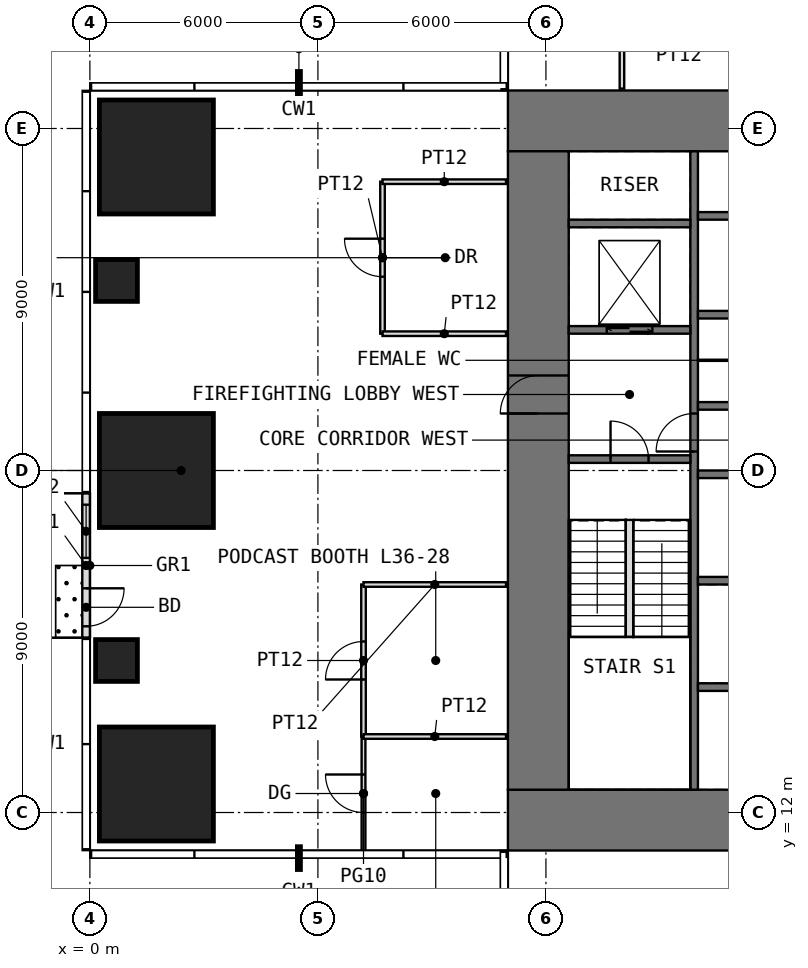
"""IFC4 building model, lengths in metres.
Left out: names, types, materials, properties, quantities, classifications, styles, units other than length and angle.
Written with IfcOpenShell. Run it as: python <this file> out.ifc"""

import sys

from ifc_helpers import new_model, si_unit, direction, frame, frame_2d, origin, origin_2d, place, context, subcontext, project, spatial, rectangle, extrude, element, fill, save


model = new_model("IFC4")
c1 = context("Model", 3, precision=1e-05, world=origin(), true_north=direction((0.0, 1.0)))
c2 = subcontext(c1, "Body", "Model", "MODEL_VIEW")
j1 = project(units=[si_unit("LENGTHUNIT", "METRE"), si_unit("PLANEANGLEUNIT", "RADIAN")], contexts=[c1])
p1 = place(None, origin())
s1 = spatial("IfcSite", under=j1, at=p1, CompositionType="ELEMENT")
p2 = place(p1, origin())
s2 = spatial("IfcBuilding", under=s1, at=p2, CompositionType="ELEMENT")
p3 = place(p2, frame((0.0, 0.0, 152.5)))
s3 = spatial("IfcBuildingStorey", under=s2, at=p3, CompositionType="ELEMENT", Elevation=152.5)
p4 = place(p3, frame((1.75, 12.75, 0.0), z_axis=(0.0, 0.0, 1.0), x_axis=(1.0, 0.0, 0.0)))
e1 = element("IfcColumn", 1, at=p4, inside=s3, PredefinedType="COLUMN", context=c2, shape_type="SweptSolid", body=[
    extrude(rectangle(XDim=3.0, YDim=3.0, at=origin_2d()), origin(), (0.0, 0.0, 1.0), 4.0),
])
p5 = place(p3, frame((0.7, 16.0, 0.0), z_axis=(0.0, 0.0, 1.0), x_axis=(1.0, 0.0, 0.0)))
e2 = element("IfcColumn", 2, at=p5, inside=s3, PredefinedType="COLUMN", context=c2, shape_type="SweptSolid", body=[
    extrude(rectangle(XDim=1.1, YDim=1.1, at=origin_2d()), origin(), (0.0, 0.0, 1.0), 4.0),
])
p6 = place(p3, frame((1.75, 21.0, 0.0), z_axis=(0.0, 0.0, 1.0), x_axis=(1.0, 0.0, 0.0)))
e3 = element("IfcColumn", 3, at=p6, inside=s3, PredefinedType="COLUMN", context=c2, shape_type="SweptSolid", body=[
    extrude(rectangle(XDim=3.0, YDim=3.0, at=origin_2d()), origin(), (0.0, 0.0, 1.0), 4.0),
])
p7 = place(p3, frame((0.7, 26.0, 0.0), z_axis=(0.0, 0.0, 1.0), x_axis=(1.0, 0.0, 0.0)))
e4 = element("IfcColumn", 4, at=p7, inside=s3, PredefinedType="COLUMN", context=c2, shape_type="SweptSolid", body=[
    extrude(rectangle(XDim=1.1, YDim=1.1, at=origin_2d()), origin(), (0.0, 0.0, 1.0), 4.0),
])
p8 = place(p3, frame((1.75, 29.25, 0.0), z_axis=(0.0, 0.0, 1.0), x_axis=(1.0, 0.0, 0.0)))
e5 = element("IfcColumn", 5, at=p8, inside=s3, PredefinedType="COLUMN", context=c2, shape_type="SweptSolid", body=[
    extrude(rectangle(XDim=3.0, YDim=3.0, at=origin_2d()), origin(), (0.0, 0.0, 1.0), 4.0),
])
p9 = place(p3, frame((-0.1, 20.4, 0.0), z_axis=(0.0, 0.0, 1.0), x_axis=(0.0, -1.0, 0.0)))
e6 = element("IfcWall", 6, at=p9, inside=s3, PredefinedType="USERDEFINED", context=c2, shape_type="SweptSolid", body=[
    extrude(rectangle(XDim=3.8, YDim=0.2, at=frame_2d((1.9, 0.0))), origin(), (0.0, 0.0, 1.0), 3.75),
])
p10 = place(p9, frame((2.5, 0.0, 0.0)))
e7 = element("IfcOpeningElement", 7, at=p10, cuts=e6, PredefinedType="OPENING", context=c2, shape_type="SweptSolid", body=[
    extrude(rectangle(XDim=1.0, YDim=2.4, at=frame_2d((0.5, 1.2))), frame((0.0, 0.11, 0.0), z_axis=(0.0, -1.0, 0.0), x_axis=(1.0, 0.0, 0.0)), (0.0, 0.0, 1.0), 0.22),
])
p11 = place(p9, frame((0.3, 0.0, 0.3)))
e8 = element("IfcOpeningElement", 8, at=p11, cuts=e6, PredefinedType="OPENING", context=c2, shape_type="SweptSolid", body=[
    extrude(rectangle(XDim=1.4, YDim=2.7, at=frame_2d((0.7, 1.35))), frame((0.0, 0.11, 0.0), z_axis=(0.0, -1.0, 0.0), x_axis=(1.0, 0.0, 0.0)), (0.0, 0.0, 1.0), 0.22),
])
p12 = place(p3, frame((11.0, 11.8, -0.05), z_axis=(0.0, 0.0, 1.0), x_axis=(1.0, 0.0, 0.0)))
e9 = element("IfcWall", 9, at=p12, inside=s3, PredefinedType="SHEAR", context=c2, shape_type="SweptSolid", body=[
    extrude(rectangle(XDim=20.0, YDim=1.6, at=frame_2d((10.0, 0.0))), origin(), (0.0, 0.0, 1.0), 4.0),
])
p13 = place(p12, frame((9.0, 0.0, 0.05)))
e10 = element("IfcOpeningElement", 10, at=p13, cuts=e9, PredefinedType="OPENING", context=c2, shape_type="SweptSolid", body=[
    extrude(rectangle(XDim=2.0, YDim=2.2, at=frame_2d((1.0, 1.1))), frame((0.0, 0.81, 0.0), z_axis=(0.0, -1.0, 0.0), x_axis=(1.0, 0.0, 0.0)), (0.0, 0.0, 1.0), 1.62),
])
p14 = place(p3, frame((11.0, 30.2, -0.05), z_axis=(0.0, 0.0, 1.0), x_axis=(1.0, 0.0, 0.0)))
e11 = element("IfcWall", 11, at=p14, inside=s3, PredefinedType="SHEAR", context=c2, shape_type="SweptSolid", body=[
    extrude(rectangle(XDim=20.0, YDim=1.6, at=frame_2d((10.0, 0.0))), origin(), (0.0, 0.0, 1.0), 4.0),
])
p15 = place(p14, frame((9.0, 0.0, 0.05)))
e12 = element("IfcOpeningElement", 12, at=p15, cuts=e11, PredefinedType="OPENING", context=c2, shape_type="SweptSolid", body=[
    extrude(rectangle(XDim=2.0, YDim=2.2, at=frame_2d((1.0, 1.1))), frame((0.0, 0.81, 0.0), z_axis=(0.0, -1.0, 0.0), x_axis=(1.0, 0.0, 0.0)), (0.0, 0.0, 1.0), 1.62),
])
p16 = place(p3, frame((11.8, 12.6, -0.05), z_axis=(0.0, 0.0, 1.0), x_axis=(0.0, 1.0, 0.0)))
e13 = element("IfcWall", 13, at=p16, inside=s3, PredefinedType="SHEAR", context=c2, shape_type="SweptSolid", body=[
    extrude(rectangle(XDim=16.8, YDim=1.6, at=frame_2d((8.4, 0.0))), origin(), (0.0, 0.0, 1.0), 4.0),
])
p17 = place(p16, frame((9.9, 0.0, 0.05)))
e14 = element("IfcOpeningElement", 14, at=p17, cuts=e13, PredefinedType="OPENING", context=c2, shape_type="SweptSolid", body=[
    extrude(rectangle(XDim=1.0, YDim=2.2, at=frame_2d((0.5, 1.1))), frame((0.0, 0.81, 0.0), z_axis=(0.0, -1.0, 0.0), x_axis=(1.0, 0.0, 0.0)), (0.0, 0.0, 1.0), 1.62),
])
p18 = place(p3, frame((15.9, 12.6, -0.05), z_axis=(0.0, 0.0, 1.0), x_axis=(0.0, 1.0, 0.0)))
e15 = element("IfcWall", 15, at=p18, inside=s3, PredefinedType="SHEAR", context=c2, shape_type="SweptSolid", body=[
    extrude(rectangle(XDim=16.8, YDim=0.2, at=frame_2d((8.4, 0.0))), origin(), (0.0, 0.0, 1.0), 4.0),
])
p19 = place(p18, frame((8.9, 0.0, 0.05)))
e16 = element("IfcOpeningElement", 16, at=p19, cuts=e15, PredefinedType="OPENING", context=c2, shape_type="SweptSolid", body=[
    extrude(rectangle(XDim=1.0, YDim=2.2, at=frame_2d((0.5, 1.1))), frame((0.0, 0.11, 0.0), z_axis=(0.0, -1.0, 0.0), x_axis=(1.0, 0.0, 0.0)), (0.0, 0.0, 1.0), 0.22),
])
p20 = place(p3, frame((12.6, 21.3, -0.05), z_axis=(0.0, 0.0, 1.0), x_axis=(1.0, 0.0, 0.0)))
e17 = element("IfcWall", 17, at=p20, inside=s3, PredefinedType="SHEAR", context=c2, shape_type="SweptSolid", body=[
    extrude(rectangle(XDim=3.2, YDim=0.2, at=frame_2d((1.6, 0.0))), origin(), (0.0, 0.0, 1.0), 4.0),
])
p21 = place(p20, frame((1.1, 0.0, 0.05)))
e18 = element("IfcOpeningElement", 18, at=p21, cuts=e17, PredefinedType="OPENING", context=c2, shape_type="SweptSolid", body=[
    extrude(rectangle(XDim=1.0, YDim=2.2, at=frame_2d((0.5, 1.1))), frame((0.0, 0.11, 0.0), z_axis=(0.0, -1.0, 0.0), x_axis=(1.0, 0.0, 0.0)), (0.0, 0.0, 1.0), 0.22),
])
p22 = place(p3, frame((12.6, 24.7, -0.05), z_axis=(0.0, 0.0, 1.0), x_axis=(1.0, 0.0, 0.0)))
e19 = element("IfcWall", 19, at=p22, inside=s3, PredefinedType="SHEAR", context=c2, shape_type="SweptSolid", body=[
    extrude(rectangle(XDim=3.2, YDim=0.2, at=frame_2d((1.6, 0.0))), origin(), (0.0, 0.0, 1.0), 4.0),
])
p23 = place(p22, frame((1.0, 0.0, 0.05)))
e20 = element("IfcOpeningElement", 20, at=p23, cuts=e19, PredefinedType="OPENING", context=c2, shape_type="SweptSolid", body=[
    extrude(rectangle(XDim=1.2, YDim=2.2, at=frame_2d((0.6, 1.1))), frame((0.0, 0.11, 0.0), z_axis=(0.0, -1.0, 0.0), x_axis=(1.0, 0.0, 0.0)), (0.0, 0.0, 1.0), 0.22),
])
for number, where, z_axis, x_axis in (
    (21, (12.6, 27.5, -0.05), (0.0, 0.0, 1.0), (1.0, 0.0, 0.0)),
    (22, (16.0, 15.3, -0.05), (0.0, 0.0, 1.0), (1.0, 0.0, 0.0)),
    (23, (16.0, 18.1, -0.05), (0.0, 0.0, 1.0), (1.0, 0.0, 0.0)),
    (24, (16.0, 20.9, -0.05), (0.0, 0.0, 1.0), (1.0, 0.0, 0.0)),
    (25, (16.0, 22.7, -0.05), (0.0, 0.0, 1.0), (1.0, 0.0, 0.0)),
    (26, (16.0, 25.1, -0.05), (0.0, 0.0, 1.0), (1.0, 0.0, 0.0)),
    (27, (16.0, 27.7, -0.05), (0.0, 0.0, 1.0), (1.0, 0.0, 0.0)),
):
    element("IfcWall", number, at=place(p3, frame(where, z_axis=z_axis, x_axis=x_axis)), inside=s3, PredefinedType="SHEAR", context=c2, shape_type="SweptSolid", body=[
        extrude(rectangle(XDim=3.2, YDim=0.2, at=frame_2d((1.6, 0.0))), origin(), (0.0, 0.0, 1.0), 4.0),
    ])
p24 = place(p3, frame((16.0, 23.9, 0.0), z_axis=(0.0, 0.0, 1.0), x_axis=(1.0, 0.0, 0.0)))
e28 = element("IfcWall", 28, at=p24, inside=s3, PredefinedType="PARTITIONING", context=c2, shape_type="SweptSolid", body=[
    extrude(rectangle(XDim=1.4, YDim=0.03, at=frame_2d((0.7, 0.0))), origin(), (0.0, 0.0, 1.0), 3.75),
])
p25 = place(p3, frame((7.2, 11.0, 0.0), z_axis=(0.0, 0.0, 1.0), x_axis=(0.0, 1.0, 0.0)))
e29 = element("IfcWall", 29, at=p25, inside=s3, PredefinedType="PARTITIONING", context=c2, shape_type="SweptSolid", body=[
    extrude(rectangle(XDim=3.0, YDim=0.1, at=frame_2d((1.5, 0.0))), origin(), (0.0, 0.0, 1.0), 3.75),
])
p26 = place(p25, frame((1.0, 0.0, 0.0)))
e30 = element("IfcOpeningElement", 30, at=p26, cuts=e29, PredefinedType="OPENING", context=c2, shape_type="SweptSolid", body=[
    extrude(rectangle(XDim=1.0, YDim=2.4, at=frame_2d((0.5, 1.2))), frame((0.0, 0.06, 0.0), z_axis=(0.0, -1.0, 0.0), x_axis=(1.0, 0.0, 0.0)), (0.0, 0.0, 1.0), 0.12),
])
p27 = place(p3, frame((7.2, 14.0, 0.0), z_axis=(0.0, 0.0, 1.0), x_axis=(0.0, 1.0, 0.0)))
e31 = element("IfcWall", 31, at=p27, inside=s3, PredefinedType="PARTITIONING", context=c2, shape_type="SweptSolid", body=[
    extrude(rectangle(XDim=4.0, YDim=0.12, at=frame_2d((2.0, 0.0))), origin(), (0.0, 0.0, 1.0), 3.75),
])
p28 = place(p27, frame((1.5, 0.0, 0.0)))
e32 = element("IfcOpeningElement", 32, at=p28, cuts=e31, PredefinedType="OPENING", context=c2, shape_type="SweptSolid", body=[
    extrude(rectangle(XDim=1.0, YDim=2.2, at=frame_2d((0.5, 1.1))), frame((0.0, 0.07, 0.0), z_axis=(0.0, -1.0, 0.0), x_axis=(1.0, 0.0, 0.0)), (0.0, 0.0, 1.0), 0.14),
])
for number, where, z_axis, x_axis in (
    (33, (7.2, 14.0, 0.0), (0.0, 0.0, 1.0), (1.0, 0.0, 0.0)),
    (34, (7.2, 18.0, 0.0), (0.0, 0.0, 1.0), (1.0, 0.0, 0.0)),
):
    element("IfcWall", number, at=place(p3, frame(where, z_axis=z_axis, x_axis=x_axis)), inside=s3, PredefinedType="PARTITIONING", context=c2, shape_type="SweptSolid", body=[
        extrude(rectangle(XDim=3.75, YDim=0.12, at=frame_2d((1.875, 0.0))), origin(), (0.0, 0.0, 1.0), 3.75),
    ])
p29 = place(p3, frame((7.7, 24.6, 0.0), z_axis=(0.0, 0.0, 1.0), x_axis=(0.0, 1.0, 0.0)))
e35 = element("IfcWall", 35, at=p29, inside=s3, PredefinedType="PARTITIONING", context=c2, shape_type="SweptSolid", body=[
    extrude(rectangle(XDim=4.0, YDim=0.12, at=frame_2d((2.0, 0.0))), origin(), (0.0, 0.0, 1.0), 3.75),
])
p30 = place(p29, frame((1.5, 0.0, 0.0)))
e36 = element("IfcOpeningElement", 36, at=p30, cuts=e35, PredefinedType="OPENING", context=c2, shape_type="SweptSolid", body=[
    extrude(rectangle(XDim=1.0, YDim=2.2, at=frame_2d((0.5, 1.1))), frame((0.0, 0.07, 0.0), z_axis=(0.0, -1.0, 0.0), x_axis=(1.0, 0.0, 0.0)), (0.0, 0.0, 1.0), 0.14),
])
for number, where, z_axis, x_axis in (
    (37, (7.7, 24.6, 0.0), (0.0, 0.0, 1.0), (1.0, 0.0, 0.0)),
    (38, (7.7, 28.6, 0.0), (0.0, 0.0, 1.0), (1.0, 0.0, 0.0)),
):
    element("IfcWall", number, at=place(p3, frame(where, z_axis=z_axis, x_axis=x_axis)), inside=s3, PredefinedType="PARTITIONING", context=c2, shape_type="SweptSolid", body=[
        extrude(rectangle(XDim=3.25, YDim=0.12, at=frame_2d((1.625, 0.0))), origin(), (0.0, 0.0, 1.0), 3.75),
    ])
p31 = place(p3, frame((14.0, 31.05, 0.0), z_axis=(0.0, 0.0, 1.0), x_axis=(0.0, 1.0, 0.0)))
e39 = element("IfcWall", 39, at=p31, inside=s3, PredefinedType="PARTITIONING", context=c2, shape_type="SweptSolid", body=[
    extrude(rectangle(XDim=3.75, YDim=0.12, at=frame_2d((1.875, 0.0))), origin(), (0.0, 0.0, 1.0), 3.75),
])
p32 = place(p3, frame((14.2, 16.62, 0.0), z_axis=(0.0, 0.0, 1.0), x_axis=(0.0, 1.0, 0.0)))
e40 = element("IfcWall", 40, at=p32, inside=s3, PredefinedType="PARTITIONING", context=c2, shape_type="SweptSolid", body=[
    extrude(rectangle(XDim=3.08, YDim=0.2, at=frame_2d((1.54, 0.0))), origin(), (0.0, 0.0, 1.0), 4.0),
])
p33 = place(p10, origin())
e41 = element("IfcDoor", 41, at=p33, inside=s3, OperationType="SINGLE_SWING_LEFT", PredefinedType="DOOR", context=c2, shape_type="SweptSolid", body=[
    extrude(rectangle(XDim=1.0, YDim=2.4, at=frame_2d((0.5, 1.2))), frame((0.0, 0.025, 0.0), z_axis=(0.0, -1.0, 0.0), x_axis=(1.0, 0.0, 0.0)), (0.0, 0.0, 1.0), 0.05),
])
fill(e7, e41)
p34 = place(p11, origin())
e42 = element("IfcWindow", 42, at=p34, inside=s3, PartitioningType="SINGLE_PANEL", PredefinedType="WINDOW", context=c2, shape_type="SweptSolid", body=[
    extrude(rectangle(XDim=1.4, YDim=2.7, at=frame_2d((0.7, 1.35))), frame((0.0, 0.03, 0.0), z_axis=(0.0, -1.0, 0.0), x_axis=(1.0, 0.0, 0.0)), (0.0, 0.0, 1.0), 0.06),
])
fill(e8, e42)
p35 = place(p17, origin())
e43 = element("IfcDoor", 43, at=p35, inside=s3, OperationType="SINGLE_SWING_LEFT", PredefinedType="DOOR", context=c2, shape_type="SweptSolid", body=[
    extrude(rectangle(XDim=1.0, YDim=2.2, at=frame_2d((0.5, 1.1))), frame((0.0, 0.025, 0.0), z_axis=(0.0, -1.0, 0.0), x_axis=(1.0, 0.0, 0.0)), (0.0, 0.0, 1.0), 0.05),
])
fill(e14, e43)
p36 = place(p21, origin())
e44 = element("IfcDoor", 44, at=p36, inside=s3, OperationType="SINGLE_SWING_LEFT", PredefinedType="DOOR", context=c2, shape_type="SweptSolid", body=[
    extrude(rectangle(XDim=1.0, YDim=2.2, at=frame_2d((0.5, 1.1))), frame((0.0, 0.025, 0.0), z_axis=(0.0, -1.0, 0.0), x_axis=(1.0, 0.0, 0.0)), (0.0, 0.0, 1.0), 0.05),
])
fill(e18, e44)
p37 = place(p19, origin())
e45 = element("IfcDoor", 45, at=p37, inside=s3, OperationType="SINGLE_SWING_LEFT", PredefinedType="DOOR", context=c2, shape_type="SweptSolid", body=[
    extrude(rectangle(XDim=1.0, YDim=2.2, at=frame_2d((0.5, 1.1))), frame((0.0, 0.025, 0.0), z_axis=(0.0, -1.0, 0.0), x_axis=(1.0, 0.0, 0.0)), (0.0, 0.0, 1.0), 0.05),
])
fill(e16, e45)
p38 = place(p26, origin())
e46 = element("IfcDoor", 46, at=p38, inside=s3, OperationType="SINGLE_SWING_RIGHT", PredefinedType="DOOR", context=c2, shape_type="SweptSolid", body=[
    extrude(rectangle(XDim=1.0, YDim=2.4, at=frame_2d((0.5, 1.2))), frame((0.0, 0.025, 0.0), z_axis=(0.0, -1.0, 0.0), x_axis=(1.0, 0.0, 0.0)), (0.0, 0.0, 1.0), 0.05),
])
fill(e30, e46)
p39 = place(p28, origin())
e47 = element("IfcDoor", 47, at=p39, inside=s3, OperationType="SINGLE_SWING_LEFT", PredefinedType="DOOR", context=c2, shape_type="SweptSolid", body=[
    extrude(rectangle(XDim=1.0, YDim=2.2, at=frame_2d((0.5, 1.1))), frame((0.0, 0.025, 0.0), z_axis=(0.0, -1.0, 0.0), x_axis=(1.0, 0.0, 0.0)), (0.0, 0.0, 1.0), 0.05),
])
fill(e32, e47)
p40 = place(p30, origin())
e48 = element("IfcDoor", 48, at=p40, inside=s3, OperationType="SINGLE_SWING_RIGHT", PredefinedType="DOOR", context=c2, shape_type="SweptSolid", body=[
    extrude(rectangle(XDim=1.0, YDim=2.2, at=frame_2d((0.5, 1.1))), frame((0.0, 0.025, 0.0), z_axis=(0.0, -1.0, 0.0), x_axis=(1.0, 0.0, 0.0)), (0.0, 0.0, 1.0), 0.05),
])
fill(e36, e48)
p41 = place(p23, origin())
e49 = element("IfcDoor", 49, at=p41, inside=s3, OperationType="DOUBLE_DOOR_SLIDING", PredefinedType="DOOR", context=c2, shape_type="SweptSolid", body=[
    extrude(rectangle(XDim=1.2, YDim=2.2, at=frame_2d((0.6, 1.1))), frame((0.0, 0.025, 0.0), z_axis=(0.0, -1.0, 0.0), x_axis=(1.0, 0.0, 0.0)), (0.0, 0.0, 1.0), 0.05),
])
fill(e20, e49)
save(model, sys.argv[1])
